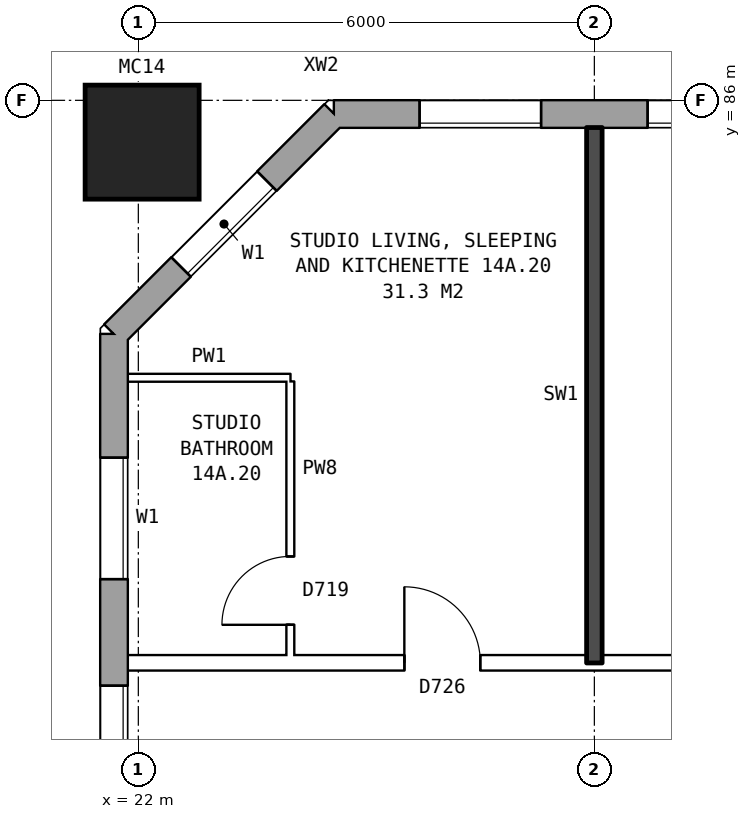
"""IFC4 building model, lengths in metres.
Left out: names, types, materials, properties, quantities, classifications, styles, units other than length and angle.
Written with IfcOpenShell. Run it as: python <this file> out.ifc"""

import sys

from ifc_helpers import new_model, si_unit, direction, frame, frame_2d, origin, origin_2d, place, context, subcontext, project, spatial, rectangle, hollow_rectangle, extrude, element, fill, save


model = new_model("IFC4")
c1 = context("Model", 3, precision=1e-05, world=origin(), true_north=direction((0.0, 1.0)))
c2 = subcontext(c1, "Body", "Model", "MODEL_VIEW")
j1 = project(units=[si_unit("LENGTHUNIT", "METRE"), si_unit("PLANEANGLEUNIT", "RADIAN")], contexts=[c1])
p1 = place(None, origin())
s1 = spatial("IfcSite", under=j1, at=p1, CompositionType="ELEMENT")
p2 = place(p1, origin())
s2 = spatial("IfcBuilding", under=s1, at=p2, CompositionType="ELEMENT")
p3 = place(p2, frame((0.0, 0.0, 53.6)))
s3 = spatial("IfcBuildingStorey", under=s2, at=p3, CompositionType="ELEMENT", Elevation=53.6)
p4 = place(p3, frame((22.05, 85.45, 0.0), z_axis=(0.0, 0.0, 1.0), x_axis=(1.0, 0.0, 0.0)))
e1 = element("IfcColumn", 1, at=p4, inside=s3, PredefinedType="COLUMN", context=c2, shape_type="SweptSolid", body=[
    extrude(hollow_rectangle(XDim=1.5, YDim=1.5, WallThickness=0.08, at=origin_2d()), origin(), (0.0, 0.0, 1.0), 3.1),
])
p5 = place(p3, frame((72.925, 85.82, 0.0), z_axis=(0.0, 0.0, 1.0), x_axis=(-1.0, 0.0, 0.0)))
e2 = element("IfcWall", 2, at=p5, inside=s3, PredefinedType="STANDARD", context=c2, shape_type="SweptSolid", body=[
    extrude(rectangle(XDim=48.351, YDim=0.36, at=frame_2d((24.175, 0.0))), origin(), (0.0, 0.0, 1.0), 2.85),
])
p6 = place(p5, frame((0.625, 0.0, 0.8)))
e3 = element("IfcOpeningElement", 3, at=p6, cuts=e2, PredefinedType="OPENING", context=c2, shape_type="SweptSolid", body=[
    extrude(rectangle(XDim=1.6, YDim=1.8, at=frame_2d((0.8, 0.9))), frame((0.0, 0.19, 0.0), z_axis=(0.0, -1.0, 0.0), x_axis=(1.0, 0.0, 0.0)), (0.0, 0.0, 1.0), 0.38),
])
p7 = place(p5, frame((3.625, 0.0, 0.8)))
e4 = element("IfcOpeningElement", 4, at=p7, cuts=e2, PredefinedType="OPENING", context=c2, shape_type="SweptSolid", body=[
    extrude(rectangle(XDim=1.6, YDim=1.8, at=frame_2d((0.8, 0.9))), frame((0.0, 0.19, 0.0), z_axis=(0.0, -1.0, 0.0), x_axis=(1.0, 0.0, 0.0)), (0.0, 0.0, 1.0), 0.38),
])
p8 = place(p5, frame((6.625, 0.0, 0.8)))
e5 = element("IfcOpeningElement", 5, at=p8, cuts=e2, PredefinedType="OPENING", context=c2, shape_type="SweptSolid", body=[
    extrude(rectangle(XDim=1.6, YDim=1.8, at=frame_2d((0.8, 0.9))), frame((0.0, 0.19, 0.0), z_axis=(0.0, -1.0, 0.0), x_axis=(1.0, 0.0, 0.0)), (0.0, 0.0, 1.0), 0.38),
])
p9 = place(p5, frame((9.625, 0.0, 0.8)))
e6 = element("IfcOpeningElement", 6, at=p9, cuts=e2, PredefinedType="OPENING", context=c2, shape_type="SweptSolid", body=[
    extrude(rectangle(XDim=1.6, YDim=1.8, at=frame_2d((0.8, 0.9))), frame((0.0, 0.19, 0.0), z_axis=(0.0, -1.0, 0.0), x_axis=(1.0, 0.0, 0.0)), (0.0, 0.0, 1.0), 0.38),
])
p10 = place(p5, frame((12.075, 0.0, 1.55)))
e7 = element("IfcOpeningElement", 7, at=p10, cuts=e2, PredefinedType="OPENING", context=c2, shape_type="SweptSolid", body=[
    extrude(rectangle(XDim=0.6, YDim=0.9, at=frame_2d((0.3, 0.45))), frame((0.0, 0.19, 0.0), z_axis=(0.0, -1.0, 0.0), x_axis=(1.0, 0.0, 0.0)), (0.0, 0.0, 1.0), 0.38),
])
p11 = place(p5, frame((15.625, 0.0, 0.8)))
e8 = element("IfcOpeningElement", 8, at=p11, cuts=e2, PredefinedType="OPENING", context=c2, shape_type="SweptSolid", body=[
    extrude(rectangle(XDim=1.6, YDim=1.8, at=frame_2d((0.8, 0.9))), frame((0.0, 0.19, 0.0), z_axis=(0.0, -1.0, 0.0), x_axis=(1.0, 0.0, 0.0)), (0.0, 0.0, 1.0), 0.38),
])
p12 = place(p5, frame((18.625, 0.0, 0.8)))
e9 = element("IfcOpeningElement", 9, at=p12, cuts=e2, PredefinedType="OPENING", context=c2, shape_type="SweptSolid", body=[
    extrude(rectangle(XDim=1.6, YDim=1.8, at=frame_2d((0.8, 0.9))), frame((0.0, 0.19, 0.0), z_axis=(0.0, -1.0, 0.0), x_axis=(1.0, 0.0, 0.0)), (0.0, 0.0, 1.0), 0.38),
])
p13 = place(p5, frame((21.625, 0.0, 0.8)))
e10 = element("IfcOpeningElement", 10, at=p13, cuts=e2, PredefinedType="OPENING", context=c2, shape_type="SweptSolid", body=[
    extrude(rectangle(XDim=1.6, YDim=1.8, at=frame_2d((0.8, 0.9))), frame((0.0, 0.19, 0.0), z_axis=(0.0, -1.0, 0.0), x_axis=(1.0, 0.0, 0.0)), (0.0, 0.0, 1.0), 0.38),
])
p14 = place(p5, frame((24.625, 0.0, 0.8)))
e11 = element("IfcOpeningElement", 11, at=p14, cuts=e2, PredefinedType="OPENING", context=c2, shape_type="SweptSolid", body=[
    extrude(rectangle(XDim=1.6, YDim=1.8, at=frame_2d((0.8, 0.9))), frame((0.0, 0.19, 0.0), z_axis=(0.0, -1.0, 0.0), x_axis=(1.0, 0.0, 0.0)), (0.0, 0.0, 1.0), 0.38),
])
p15 = place(p5, frame((27.625, 0.0, 0.8)))
e12 = element("IfcOpeningElement", 12, at=p15, cuts=e2, PredefinedType="OPENING", context=c2, shape_type="SweptSolid", body=[
    extrude(rectangle(XDim=1.6, YDim=1.8, at=frame_2d((0.8, 0.9))), frame((0.0, 0.19, 0.0), z_axis=(0.0, -1.0, 0.0), x_axis=(1.0, 0.0, 0.0)), (0.0, 0.0, 1.0), 0.38),
])
p16 = place(p5, frame((30.625, 0.0, 0.8)))
e13 = element("IfcOpeningElement", 13, at=p16, cuts=e2, PredefinedType="OPENING", context=c2, shape_type="SweptSolid", body=[
    extrude(rectangle(XDim=1.6, YDim=1.8, at=frame_2d((0.8, 0.9))), frame((0.0, 0.19, 0.0), z_axis=(0.0, -1.0, 0.0), x_axis=(1.0, 0.0, 0.0)), (0.0, 0.0, 1.0), 0.38),
])
p17 = place(p5, frame((33.125, 0.0, 0.25)))
e14 = element("IfcOpeningElement", 14, at=p17, cuts=e2, PredefinedType="OPENING", context=c2, shape_type="SweptSolid", body=[
    extrude(rectangle(XDim=0.8, YDim=1.5, at=frame_2d((0.4, 0.75))), frame((0.0, 0.19, 0.0), z_axis=(0.0, -1.0, 0.0), x_axis=(1.0, 0.0, 0.0)), (0.0, 0.0, 1.0), 0.38),
])
p18 = place(p5, frame((36.625, 0.0, 0.8)))
e15 = element("IfcOpeningElement", 15, at=p18, cuts=e2, PredefinedType="OPENING", context=c2, shape_type="SweptSolid", body=[
    extrude(rectangle(XDim=1.6, YDim=1.8, at=frame_2d((0.8, 0.9))), frame((0.0, 0.19, 0.0), z_axis=(0.0, -1.0, 0.0), x_axis=(1.0, 0.0, 0.0)), (0.0, 0.0, 1.0), 0.38),
])
p19 = place(p5, frame((39.625, 0.0, 0.8)))
e16 = element("IfcOpeningElement", 16, at=p19, cuts=e2, PredefinedType="OPENING", context=c2, shape_type="SweptSolid", body=[
    extrude(rectangle(XDim=1.6, YDim=1.8, at=frame_2d((0.8, 0.9))), frame((0.0, 0.19, 0.0), z_axis=(0.0, -1.0, 0.0), x_axis=(1.0, 0.0, 0.0)), (0.0, 0.0, 1.0), 0.38),
])
p20 = place(p5, frame((42.625, 0.0, 0.8)))
e17 = element("IfcOpeningElement", 17, at=p20, cuts=e2, PredefinedType="OPENING", context=c2, shape_type="SweptSolid", body=[
    extrude(rectangle(XDim=1.6, YDim=1.8, at=frame_2d((0.8, 0.9))), frame((0.0, 0.19, 0.0), z_axis=(0.0, -1.0, 0.0), x_axis=(1.0, 0.0, 0.0)), (0.0, 0.0, 1.0), 0.38),
])
p21 = place(p5, frame((45.625, 0.0, 0.8)))
e18 = element("IfcOpeningElement", 18, at=p21, cuts=e2, PredefinedType="OPENING", context=c2, shape_type="SweptSolid", body=[
    extrude(rectangle(XDim=1.6, YDim=1.8, at=frame_2d((0.8, 0.9))), frame((0.0, 0.19, 0.0), z_axis=(0.0, -1.0, 0.0), x_axis=(1.0, 0.0, 0.0)), (0.0, 0.0, 1.0), 0.38),
])
p22 = place(p5, frame((13.325, 0.0, 0.15)))
e19 = element("IfcOpeningElement", 19, at=p22, cuts=e2, PredefinedType="OPENING", context=c2, shape_type="SweptSolid", body=[
    extrude(rectangle(XDim=1.4, YDim=0.9, at=frame_2d((0.7, 0.45))), frame((0.0, 0.19, 0.0), z_axis=(0.0, -1.0, 0.0), x_axis=(1.0, 0.0, 0.0)), (0.0, 0.0, 1.0), 0.38),
])
p23 = place(p5, frame((34.225, 0.0, 0.25)))
e20 = element("IfcOpeningElement", 20, at=p23, cuts=e2, PredefinedType="OPENING", context=c2, shape_type="SweptSolid", body=[
    extrude(rectangle(XDim=0.6, YDim=0.9, at=frame_2d((0.3, 0.45))), frame((0.0, 0.19, 0.0), z_axis=(0.0, -1.0, 0.0), x_axis=(1.0, 0.0, 0.0)), (0.0, 0.0, 1.0), 0.38),
])
p24 = place(p3, frame((24.575, 85.82, 0.0), z_axis=(0.0, 0.0, 1.0), x_axis=(-0.707106781187, -0.707106781187, 0.0)))
e21 = element("IfcWall", 21, at=p24, inside=s3, PredefinedType="STANDARD", context=c2, shape_type="SweptSolid", body=[
    extrude(rectangle(XDim=4.094, YDim=0.36, at=frame_2d((2.047, 0.0))), origin(), (0.0, 0.0, 1.0), 2.85),
])
p25 = place(p24, frame((1.247, 0.0, 0.8)))
e22 = element("IfcOpeningElement", 22, at=p25, cuts=e21, PredefinedType="OPENING", context=c2, shape_type="SweptSolid", body=[
    extrude(rectangle(XDim=1.6, YDim=1.8, at=frame_2d((0.8, 0.9))), frame((0.0, 0.19, 0.0), z_axis=(0.0, -1.0, 0.0), x_axis=(1.0, 0.0, 0.0)), (0.0, 0.0, 1.0), 0.38),
])
p26 = place(p3, frame((21.68, 82.925, 0.0), z_axis=(0.0, 0.0, 1.0), x_axis=(0.0, -1.0, 0.0)))
e23 = element("IfcWall", 23, at=p26, inside=s3, PredefinedType="STANDARD", context=c2, shape_type="SweptSolid", body=[
    extrude(rectangle(XDim=25.851, YDim=0.36, at=frame_2d((12.925, 0.0))), origin(), (0.0, 0.0, 1.0), 2.85),
])
p27 = place(p26, frame((1.625, 0.0, 0.8)))
e24 = element("IfcOpeningElement", 24, at=p27, cuts=e23, PredefinedType="OPENING", context=c2, shape_type="SweptSolid", body=[
    extrude(rectangle(XDim=1.6, YDim=1.8, at=frame_2d((0.8, 0.9))), frame((0.0, 0.19, 0.0), z_axis=(0.0, -1.0, 0.0), x_axis=(1.0, 0.0, 0.0)), (0.0, 0.0, 1.0), 0.38),
])
p28 = place(p26, frame((4.625, 0.0, 0.8)))
e25 = element("IfcOpeningElement", 25, at=p28, cuts=e23, PredefinedType="OPENING", context=c2, shape_type="SweptSolid", body=[
    extrude(rectangle(XDim=1.6, YDim=1.8, at=frame_2d((0.8, 0.9))), frame((0.0, 0.19, 0.0), z_axis=(0.0, -1.0, 0.0), x_axis=(1.0, 0.0, 0.0)), (0.0, 0.0, 1.0), 0.38),
])
p29 = place(p26, frame((6.525, 0.0, 0.8)))
e26 = element("IfcOpeningElement", 26, at=p29, cuts=e23, PredefinedType="OPENING", context=c2, shape_type="SweptSolid", body=[
    extrude(rectangle(XDim=1.0, YDim=1.8, at=frame_2d((0.5, 0.9))), frame((0.0, 0.19, 0.0), z_axis=(0.0, -1.0, 0.0), x_axis=(1.0, 0.0, 0.0)), (0.0, 0.0, 1.0), 0.38),
])
p30 = place(p26, frame((7.825, 0.0, 0.8)))
e27 = element("IfcOpeningElement", 27, at=p30, cuts=e23, PredefinedType="OPENING", context=c2, shape_type="SweptSolid", body=[
    extrude(rectangle(XDim=1.2, YDim=0.9, at=frame_2d((0.6, 0.45))), frame((0.0, 0.19, 0.0), z_axis=(0.0, -1.0, 0.0), x_axis=(1.0, 0.0, 0.0)), (0.0, 0.0, 1.0), 0.38),
])
p31 = place(p26, frame((10.275, 0.0, 1.7)))
e28 = element("IfcOpeningElement", 28, at=p31, cuts=e23, PredefinedType="OPENING", context=c2, shape_type="SweptSolid", body=[
    extrude(rectangle(XDim=0.8, YDim=0.9, at=frame_2d((0.4, 0.45))), frame((0.0, 0.19, 0.0), z_axis=(0.0, -1.0, 0.0), x_axis=(1.0, 0.0, 0.0)), (0.0, 0.0, 1.0), 0.38),
])
p32 = place(p26, frame((11.375, 0.0, 1.1)))
e29 = element("IfcOpeningElement", 29, at=p32, cuts=e23, PredefinedType="OPENING", context=c2, shape_type="SweptSolid", body=[
    extrude(rectangle(XDim=0.6, YDim=1.5, at=frame_2d((0.3, 0.75))), frame((0.0, 0.19, 0.0), z_axis=(0.0, -1.0, 0.0), x_axis=(1.0, 0.0, 0.0)), (0.0, 0.0, 1.0), 0.38),
])
p33 = place(p26, frame((19.625, 0.0, 0.8)))
e30 = element("IfcOpeningElement", 30, at=p33, cuts=e23, PredefinedType="OPENING", context=c2, shape_type="SweptSolid", body=[
    extrude(rectangle(XDim=1.6, YDim=1.8, at=frame_2d((0.8, 0.9))), frame((0.0, 0.19, 0.0), z_axis=(0.0, -1.0, 0.0), x_axis=(1.0, 0.0, 0.0)), (0.0, 0.0, 1.0), 0.38),
])
p34 = place(p26, frame((22.625, 0.0, 0.8)))
e31 = element("IfcOpeningElement", 31, at=p34, cuts=e23, PredefinedType="OPENING", context=c2, shape_type="SweptSolid", body=[
    extrude(rectangle(XDim=1.6, YDim=1.8, at=frame_2d((0.8, 0.9))), frame((0.0, 0.19, 0.0), z_axis=(0.0, -1.0, 0.0), x_axis=(1.0, 0.0, 0.0)), (0.0, 0.0, 1.0), 0.38),
])
p35 = place(p26, frame((12.275, 0.0, 0.8)))
e32 = element("IfcOpeningElement", 32, at=p35, cuts=e23, PredefinedType="OPENING", context=c2, shape_type="SweptSolid", body=[
    extrude(rectangle(XDim=1.6, YDim=1.8, at=frame_2d((0.8, 0.9))), frame((0.0, 0.19, 0.0), z_axis=(0.0, -1.0, 0.0), x_axis=(1.0, 0.0, 0.0)), (0.0, 0.0, 1.0), 0.38),
])
p36 = place(p26, frame((14.175, 0.0, 1.7)))
e33 = element("IfcOpeningElement", 33, at=p36, cuts=e23, PredefinedType="OPENING", context=c2, shape_type="SweptSolid", body=[
    extrude(rectangle(XDim=1.4, YDim=0.9, at=frame_2d((0.7, 0.45))), frame((0.0, 0.19, 0.0), z_axis=(0.0, -1.0, 0.0), x_axis=(1.0, 0.0, 0.0)), (0.0, 0.0, 1.0), 0.38),
])
p37 = place(p26, frame((16.725, 0.0, 0.8)))
e34 = element("IfcOpeningElement", 34, at=p37, cuts=e23, PredefinedType="OPENING", context=c2, shape_type="SweptSolid", body=[
    extrude(rectangle(XDim=1.2, YDim=0.9, at=frame_2d((0.6, 0.45))), frame((0.0, 0.19, 0.0), z_axis=(0.0, -1.0, 0.0), x_axis=(1.0, 0.0, 0.0)), (0.0, 0.0, 1.0), 0.38),
])
p38 = place(p26, frame((18.275, 0.0, 0.8)))
e35 = element("IfcOpeningElement", 35, at=p38, cuts=e23, PredefinedType="OPENING", context=c2, shape_type="SweptSolid", body=[
    extrude(rectangle(XDim=1.0, YDim=1.8, at=frame_2d((0.5, 0.9))), frame((0.0, 0.19, 0.0), z_axis=(0.0, -1.0, 0.0), x_axis=(1.0, 0.0, 0.0)), (0.0, 0.0, 1.0), 0.38),
])
p39 = place(p3, frame((21.86, 78.6, 0.0), z_axis=(0.0, 0.0, 1.0), x_axis=(1.0, 0.0, 0.0)))
e36 = element("IfcWall", 36, at=p39, inside=s3, PredefinedType="PARTITIONING", context=c2, shape_type="SweptSolid", body=[
    extrude(rectangle(XDim=24.04, YDim=0.2, at=frame_2d((12.02, 0.0))), origin(), (0.0, 0.0, 1.0), 2.85),
])
p40 = place(p39, frame((20.59, 0.0, 0.0)))
e37 = element("IfcOpeningElement", 37, at=p40, cuts=e36, PredefinedType="OPENING", context=c2, shape_type="SweptSolid", body=[
    extrude(rectangle(XDim=1.0, YDim=2.1, at=frame_2d((0.5, 1.05))), frame((0.0, 0.11, 0.0), z_axis=(0.0, -1.0, 0.0), x_axis=(1.0, 0.0, 0.0)), (0.0, 0.0, 1.0), 0.22),
])
p41 = place(p39, frame((8.64, 0.0, 0.0)))
e38 = element("IfcOpeningElement", 38, at=p41, cuts=e36, PredefinedType="OPENING", context=c2, shape_type="SweptSolid", body=[
    extrude(rectangle(XDim=1.0, YDim=2.1, at=frame_2d((0.5, 1.05))), frame((0.0, 0.11, 0.0), z_axis=(0.0, -1.0, 0.0), x_axis=(1.0, 0.0, 0.0)), (0.0, 0.0, 1.0), 0.22),
])
p42 = place(p39, frame((3.64, 0.0, 0.0)))
e39 = element("IfcOpeningElement", 39, at=p42, cuts=e36, PredefinedType="OPENING", context=c2, shape_type="SweptSolid", body=[
    extrude(rectangle(XDim=1.0, YDim=2.1, at=frame_2d((0.5, 1.05))), frame((0.0, 0.11, 0.0), z_axis=(0.0, -1.0, 0.0), x_axis=(1.0, 0.0, 0.0)), (0.0, 0.0, 1.0), 0.22),
])
p43 = place(p3, frame((21.86, 82.35, 0.0), z_axis=(0.0, 0.0, 1.0), x_axis=(1.0, 0.0, 0.0)))
e40 = element("IfcWall", 40, at=p43, inside=s3, PredefinedType="PARTITIONING", context=c2, shape_type="SweptSolid", body=[
    extrude(rectangle(XDim=2.14, YDim=0.1, at=frame_2d((1.07, 0.0))), origin(), (0.0, 0.0, 1.0), 2.85),
])
p44 = place(p3, frame((24.0, 78.7, 0.0), z_axis=(0.0, 0.0, 1.0), x_axis=(0.0, 1.0, 0.0)))
e41 = element("IfcWall", 41, at=p44, inside=s3, PredefinedType="PARTITIONING", context=c2, shape_type="SweptSolid", body=[
    extrude(rectangle(XDim=3.6, YDim=0.1, at=frame_2d((1.8, 0.0))), origin(), (0.0, 0.0, 1.0), 2.85),
])
p45 = place(p44, frame((0.4, 0.0, 0.0)))
e42 = element("IfcOpeningElement", 42, at=p45, cuts=e41, PredefinedType="OPENING", context=c2, shape_type="SweptSolid", body=[
    extrude(rectangle(XDim=0.9, YDim=2.1, at=frame_2d((0.45, 1.05))), frame((0.0, 0.06, 0.0), z_axis=(0.0, -1.0, 0.0), x_axis=(1.0, 0.0, 0.0)), (0.0, 0.0, 1.0), 0.12),
])
p46 = place(p3, frame((28.0, 78.6, 0.0), z_axis=(0.0, 0.0, 1.0), x_axis=(0.0, 1.0, 0.0)))
e43 = element("IfcWall", 43, at=p46, inside=s3, PredefinedType="SOLIDWALL", context=c2, shape_type="SweptSolid", body=[
    extrude(rectangle(XDim=7.04, YDim=0.2, at=frame_2d((3.52, 0.0))), origin(), (0.0, 0.0, 1.0), 2.85),
])
p47 = place(p20, origin())
e44 = element("IfcWindow", 44, at=p47, inside=s3, PartitioningType="SINGLE_PANEL", PredefinedType="WINDOW", context=c2, shape_type="SweptSolid", body=[
    extrude(rectangle(XDim=1.6, YDim=1.8, at=frame_2d((0.8, 0.9))), frame((0.0, 0.15, 0.0), z_axis=(0.0, -1.0, 0.0), x_axis=(1.0, 0.0, 0.0)), (0.0, 0.0, 1.0), 0.06),
])
fill(e17, e44)
p48 = place(p21, origin())
e45 = element("IfcWindow", 45, at=p48, inside=s3, PartitioningType="SINGLE_PANEL", PredefinedType="WINDOW", context=c2, shape_type="SweptSolid", body=[
    extrude(rectangle(XDim=1.6, YDim=1.8, at=frame_2d((0.8, 0.9))), frame((0.0, 0.15, 0.0), z_axis=(0.0, -1.0, 0.0), x_axis=(1.0, 0.0, 0.0)), (0.0, 0.0, 1.0), 0.06),
])
fill(e18, e45)
p49 = place(p25, origin())
e46 = element("IfcWindow", 46, at=p49, inside=s3, PartitioningType="SINGLE_PANEL", PredefinedType="WINDOW", context=c2, shape_type="SweptSolid", body=[
    extrude(rectangle(XDim=1.6, YDim=1.8, at=frame_2d((0.8, 0.9))), frame((0.0, 0.15, 0.0), z_axis=(0.0, -1.0, 0.0), x_axis=(1.0, 0.0, 0.0)), (0.0, 0.0, 1.0), 0.06),
])
fill(e22, e46)
p50 = place(p27, origin())
e47 = element("IfcWindow", 47, at=p50, inside=s3, PartitioningType="SINGLE_PANEL", PredefinedType="WINDOW", context=c2, shape_type="SweptSolid", body=[
    extrude(rectangle(XDim=1.6, YDim=1.8, at=frame_2d((0.8, 0.9))), frame((0.0, 0.15, 0.0), z_axis=(0.0, -1.0, 0.0), x_axis=(1.0, 0.0, 0.0)), (0.0, 0.0, 1.0), 0.06),
])
fill(e24, e47)
p51 = place(p28, origin())
e48 = element("IfcWindow", 48, at=p51, inside=s3, PartitioningType="SINGLE_PANEL", PredefinedType="WINDOW", context=c2, shape_type="SweptSolid", body=[
    extrude(rectangle(XDim=1.6, YDim=1.8, at=frame_2d((0.8, 0.9))), frame((0.0, 0.15, 0.0), z_axis=(0.0, -1.0, 0.0), x_axis=(1.0, 0.0, 0.0)), (0.0, 0.0, 1.0), 0.06),
])
fill(e25, e48)
p52 = place(p42, origin())
e49 = element("IfcDoor", 49, at=p52, inside=s3, OperationType="SINGLE_SWING_LEFT", PredefinedType="DOOR", context=c2, shape_type="SweptSolid", body=[
    extrude(rectangle(XDim=1.0, YDim=2.1, at=frame_2d((0.5, 1.05))), frame((0.0, 0.025, 0.0), z_axis=(0.0, -1.0, 0.0), x_axis=(1.0, 0.0, 0.0)), (0.0, 0.0, 1.0), 0.05),
])
fill(e39, e49)
p53 = place(p45, origin())
e50 = element("IfcDoor", 50, at=p53, inside=s3, OperationType="SINGLE_SWING_LEFT", PredefinedType="DOOR", context=c2, shape_type="SweptSolid", body=[
    extrude(rectangle(XDim=0.9, YDim=2.1, at=frame_2d((0.45, 1.05))), frame((0.0, 0.025, 0.0), z_axis=(0.0, -1.0, 0.0), x_axis=(1.0, 0.0, 0.0)), (0.0, 0.0, 1.0), 0.05),
])
fill(e42, e50)
save(model, sys.argv[1])
